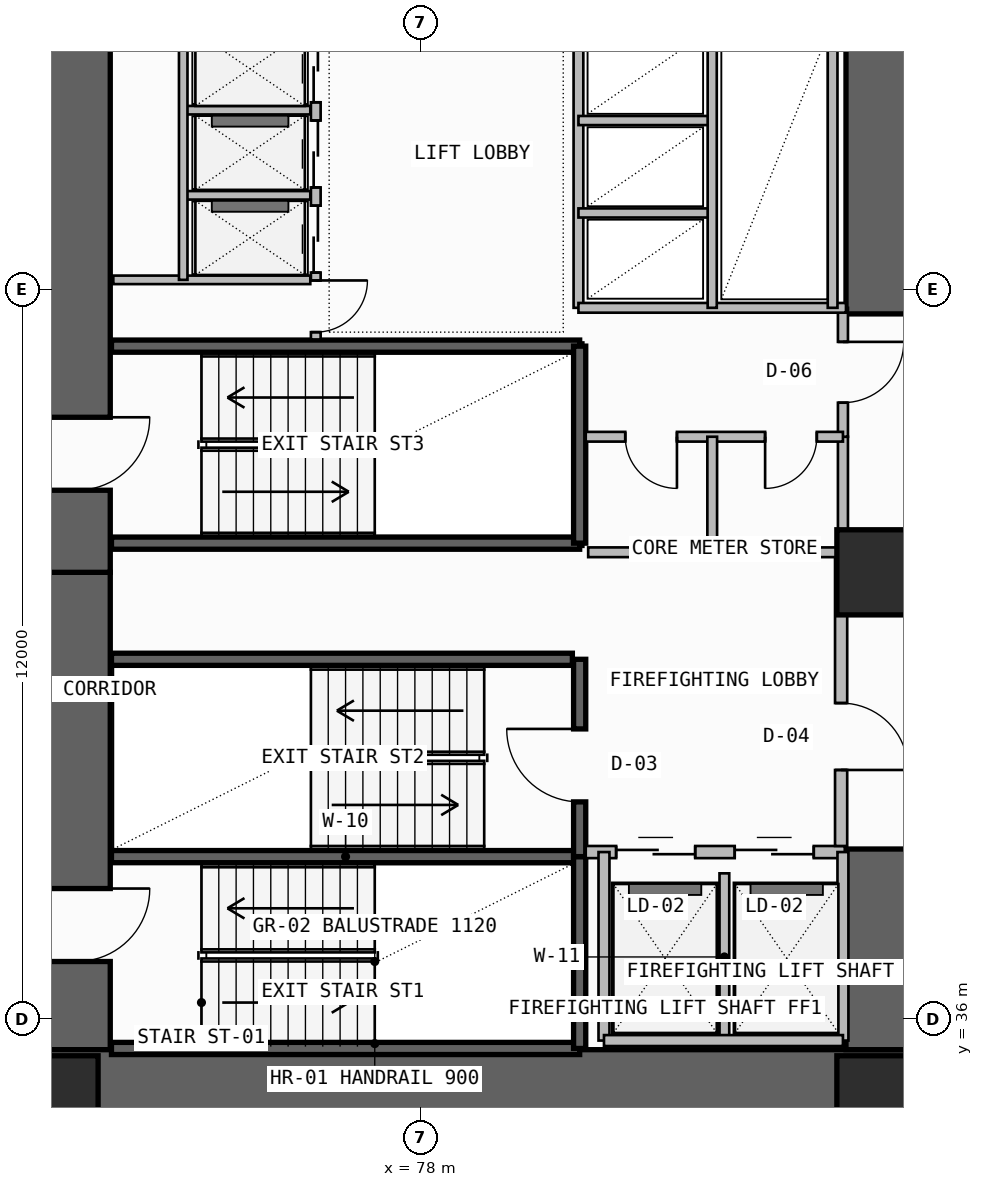
"""IFC4 building model, lengths in metres.
Left out: names, types, materials, properties, quantities, classifications, styles, units other than length and angle.
Written with IfcOpenShell. Run it as: python <this file> out.ifc"""

import sys

from ifc_helpers import new_model, si_unit, direction, frame, frame_2d, origin, origin_2d, place, context, subcontext, project, spatial, rectangle, extrude, element, fill, save


model = new_model("IFC4")
c1 = context("Model", 3, precision=1e-05, world=origin(), true_north=direction((0.0, 1.0)))
c2 = subcontext(c1, "Body", "Model", "MODEL_VIEW")
j1 = project(units=[si_unit("LENGTHUNIT", "METRE"), si_unit("PLANEANGLEUNIT", "RADIAN")], contexts=[c1])
p1 = place(None, origin())
s1 = spatial("IfcSite", under=j1, at=p1, CompositionType="ELEMENT")
p2 = place(p1, origin())
s2 = spatial("IfcBuilding", under=s1, at=p2, CompositionType="ELEMENT")
p3 = place(p2, frame((0.0, 0.0, 44.7)))
s3 = spatial("IfcBuildingStorey", under=s2, at=p3, CompositionType="ELEMENT", Elevation=44.7)
p4 = place(p3, frame((72.35, 35.5, -0.2), z_axis=(0.0, 0.0, 1.0), x_axis=(0.0, 1.0, 0.0)))
e1 = element("IfcWall", 1, at=p4, inside=s3, PredefinedType="SHEAR", context=c2, shape_type="SweptSolid", body=[
    extrude(rectangle(XDim=7.85, YDim=1.1, at=frame_2d((3.925, 0.0))), origin(), (0.0, 0.0, 1.0), 3.54),
])
p5 = place(p4, frame((1.45, 0.0, 0.2)))
e2 = element("IfcOpeningElement", 2, at=p5, cuts=e1, PredefinedType="OPENING", context=c2, shape_type="SweptSolid", body=[
    extrude(rectangle(XDim=1.2, YDim=2.2, at=frame_2d((0.6, 1.1))), frame((0.0, 0.56, 0.0), z_axis=(0.0, -1.0, 0.0), x_axis=(1.0, 0.0, 0.0)), (0.0, 0.0, 1.0), 1.12),
])
p6 = place(p3, frame((71.8, 34.95, -0.2), z_axis=(0.0, 0.0, 1.0), x_axis=(1.0, 0.0, 0.0)))
e3 = element("IfcWall", 3, at=p6, inside=s3, PredefinedType="SHEAR", context=c2, shape_type="SweptSolid", body=[
    extrude(rectangle(XDim=14.3, YDim=1.1, at=frame_2d((7.15, 0.0))), origin(), (0.0, 0.0, 1.0), 3.54),
])
p7 = place(p3, frame((85.55, 35.5, -0.2), z_axis=(0.0, 0.0, 1.0), x_axis=(0.0, 1.0, 0.0)))
e4 = element("IfcWall", 4, at=p7, inside=s3, PredefinedType="SHEAR", context=c2, shape_type="SweptSolid", body=[
    extrude(rectangle(XDim=3.3, YDim=1.1, at=frame_2d((1.65, 0.0))), origin(), (0.0, 0.0, 1.0), 3.54),
])
p8 = place(p3, frame((72.35, 43.35, -0.2), z_axis=(0.0, 0.0, 1.0), x_axis=(0.0, 1.0, 0.0)))
e5 = element("IfcWall", 5, at=p8, inside=s3, PredefinedType="SHEAR", context=c2, shape_type="SweptSolid", body=[
    extrude(rectangle(XDim=12.7, YDim=1.1, at=frame_2d((6.35, 0.0))), origin(), (0.0, 0.0, 1.0), 3.54),
])
p9 = place(p8, frame((1.35, 0.0, 0.2)))
e6 = element("IfcOpeningElement", 6, at=p9, cuts=e5, PredefinedType="OPENING", context=c2, shape_type="SweptSolid", body=[
    extrude(rectangle(XDim=1.2, YDim=2.2, at=frame_2d((0.6, 1.1))), frame((0.0, 0.56, 0.0), z_axis=(0.0, -1.0, 0.0), x_axis=(1.0, 0.0, 0.0)), (0.0, 0.0, 1.0), 1.12),
])
p10 = place(p3, frame((85.55, 47.6, -0.2), z_axis=(0.0, 0.0, 1.0), x_axis=(0.0, 1.0, 0.0)))
e7 = element("IfcWall", 7, at=p10, inside=s3, PredefinedType="SHEAR", context=c2, shape_type="SweptSolid", body=[
    extrude(rectangle(XDim=8.45, YDim=1.1, at=frame_2d((4.225, 0.0))), origin(), (0.0, 0.0, 1.0), 3.54),
])
for number, where, z_axis, x_axis in (
    (8, (72.0, 34.7, 0.0), (0.0, 0.0, 1.0), (1.0, 0.0, 0.0)),
    (9, (85.55, 34.7, 0.0), (0.0, 0.0, 1.0), (1.0, 0.0, 0.0)),
    (10, (85.55, 43.35, 0.0), (0.0, 0.0, 1.0), (1.0, 0.0, 0.0)),
):
    element("IfcColumn", number, at=place(p3, frame(where, z_axis=z_axis, x_axis=x_axis)), inside=s3, PredefinedType="COLUMN", context=c2, shape_type="SweptSolid", body=[
        extrude(rectangle(XDim=1.4, YDim=1.4, at=origin_2d()), origin(), (0.0, 0.0, 1.0), 3.6),
    ])
for number, where, z_axis, x_axis in (
    (11, (72.92, 35.52, -0.2), (0.0, 0.0, 1.0), (1.0, 0.0, 0.0)),
    (12, (72.92, 38.675, -0.2), (0.0, 0.0, 1.0), (1.0, 0.0, 0.0)),
):
    element("IfcWall", number, at=place(p3, frame(where, z_axis=z_axis, x_axis=x_axis)), inside=s3, PredefinedType="SOLIDWALL", context=c2, shape_type="SweptSolid", body=[
        extrude(rectangle(XDim=7.7, YDim=0.2, at=frame_2d((3.85, 0.0))), origin(), (0.0, 0.0, 1.0), 3.54),
    ])
p11 = place(p3, frame((80.62, 35.52, -0.2), z_axis=(0.0, 0.0, 1.0), x_axis=(0.0, 1.0, 0.0)))
e13 = element("IfcWall", 13, at=p11, inside=s3, PredefinedType="SOLIDWALL", context=c2, shape_type="SweptSolid", body=[
    extrude(rectangle(XDim=3.155, YDim=0.2, at=frame_2d((1.578, 0.0))), origin(), (0.0, 0.0, 1.0), 3.54),
])
p12 = place(p3, frame((80.62, 38.675, -0.2), z_axis=(0.0, 0.0, 1.0), x_axis=(0.0, 1.0, 0.0)))
e14 = element("IfcWall", 14, at=p12, inside=s3, PredefinedType="SOLIDWALL", context=c2, shape_type="SweptSolid", body=[
    extrude(rectangle(XDim=3.245, YDim=0.2, at=frame_2d((1.623, 0.0))), origin(), (0.0, 0.0, 1.0), 3.54),
])
p13 = place(p12, frame((0.9, 0.0, 0.2)))
e15 = element("IfcOpeningElement", 15, at=p13, cuts=e14, PredefinedType="OPENING", context=c2, shape_type="SweptSolid", body=[
    extrude(rectangle(XDim=1.2, YDim=2.2, at=frame_2d((0.6, 1.1))), frame((0.0, 0.11, 0.0), z_axis=(0.0, -1.0, 0.0), x_axis=(1.0, 0.0, 0.0)), (0.0, 0.0, 1.0), 0.22),
])
p14 = place(p3, frame((80.72, 38.75, 0.0), z_axis=(0.0, 0.0, 1.0), x_axis=(1.0, 0.0, 0.0)))
e16 = element("IfcWall", 16, at=p14, inside=s3, PredefinedType="SOLIDWALL", context=c2, shape_type="SweptSolid", body=[
    extrude(rectangle(XDim=4.26, YDim=0.2, at=frame_2d((2.13, 0.0))), origin(), (0.0, 0.0, 1.0), 3.34),
])
p15 = place(p14, frame((0.5, 0.0, 0.0)))
e17 = element("IfcOpeningElement", 17, at=p15, cuts=e16, PredefinedType="OPENING", context=c2, shape_type="SweptSolid", body=[
    extrude(rectangle(XDim=1.3, YDim=2.3, at=frame_2d((0.65, 1.15))), frame((0.0, 0.11, 0.0), z_axis=(0.0, -1.0, 0.0), x_axis=(1.0, 0.0, 0.0)), (0.0, 0.0, 1.0), 0.22),
])
p16 = place(p14, frame((2.45, 0.0, 0.0)))
e18 = element("IfcOpeningElement", 18, at=p16, cuts=e16, PredefinedType="OPENING", context=c2, shape_type="SweptSolid", body=[
    extrude(rectangle(XDim=1.3, YDim=2.3, at=frame_2d((0.65, 1.15))), frame((0.0, 0.11, 0.0), z_axis=(0.0, -1.0, 0.0), x_axis=(1.0, 0.0, 0.0)), (0.0, 0.0, 1.0), 0.22),
])
p17 = place(p3, frame((83.0, 35.65, 0.0), z_axis=(0.0, 0.0, 1.0), x_axis=(0.0, 1.0, 0.0)))
e19 = element("IfcWall", 19, at=p17, inside=s3, PredefinedType="PLUMBINGWALL", context=c2, shape_type="SweptSolid", body=[
    extrude(rectangle(XDim=2.75, YDim=0.16, at=frame_2d((1.375, 0.0))), origin(), (0.0, 0.0, 1.0), 3.34),
])
for number, where, z_axis, x_axis in (
    (20, (84.95, 35.65, 0.0), (0.0, 0.0, 1.0), (0.0, 1.0, 0.0)),
    (21, (81.02, 35.65, 0.0), (0.0, 0.0, 1.0), (0.0, 1.0, 0.0)),
):
    element("IfcWall", number, at=place(p3, frame(where, z_axis=z_axis, x_axis=x_axis)), inside=s3, PredefinedType="SOLIDWALL", context=c2, shape_type="SweptSolid", body=[
        extrude(rectangle(XDim=3.1, YDim=0.18, at=frame_2d((1.55, 0.0))), origin(), (0.0, 0.0, 1.0), 3.34),
    ])
p18 = place(p3, frame((81.02, 35.65, 0.0), z_axis=(0.0, 0.0, 1.0), x_axis=(1.0, 0.0, 0.0)))
e22 = element("IfcWall", 22, at=p18, inside=s3, PredefinedType="SOLIDWALL", context=c2, shape_type="SweptSolid", body=[
    extrude(rectangle(XDim=3.93, YDim=0.18, at=frame_2d((1.965, 0.0))), origin(), (0.0, 0.0, 1.0), 3.34),
])
p19 = place(p3, frame((84.92, 38.85, 0.0), z_axis=(0.0, 0.0, 1.0), x_axis=(0.0, 1.0, 0.0)))
e23 = element("IfcWall", 23, at=p19, inside=s3, PredefinedType="SOLIDWALL", context=c2, shape_type="SweptSolid", body=[
    extrude(rectangle(XDim=4.83, YDim=0.2, at=frame_2d((2.415, 0.0))), origin(), (0.0, 0.0, 1.0), 3.34),
])
p20 = place(p19, frame((1.25, 0.0, 0.0)))
e24 = element("IfcOpeningElement", 24, at=p20, cuts=e23, PredefinedType="OPENING", context=c2, shape_type="SweptSolid", body=[
    extrude(rectangle(XDim=1.1, YDim=2.2, at=frame_2d((0.55, 1.1))), frame((0.0, 0.11, 0.0), z_axis=(0.0, -1.0, 0.0), x_axis=(1.0, 0.0, 0.0)), (0.0, 0.0, 1.0), 0.22),
])
p21 = place(p3, frame((72.92, 41.92, -0.2), z_axis=(0.0, 0.0, 1.0), x_axis=(1.0, 0.0, 0.0)))
e25 = element("IfcWall", 25, at=p21, inside=s3, PredefinedType="SOLIDWALL", context=c2, shape_type="SweptSolid", body=[
    extrude(rectangle(XDim=7.58, YDim=0.2, at=frame_2d((3.79, 0.0))), origin(), (0.0, 0.0, 1.0), 3.54),
])
for number, where, z_axis, x_axis in (
    (26, (72.92, 43.83, -0.2), (0.0, 0.0, 1.0), (1.0, 0.0, 0.0)),
    (27, (72.92, 47.07, -0.2), (0.0, 0.0, 1.0), (1.0, 0.0, 0.0)),
):
    element("IfcWall", number, at=place(p3, frame(where, z_axis=z_axis, x_axis=x_axis)), inside=s3, PredefinedType="SOLIDWALL", context=c2, shape_type="SweptSolid", body=[
        extrude(rectangle(XDim=7.7, YDim=0.2, at=frame_2d((3.85, 0.0))), origin(), (0.0, 0.0, 1.0), 3.54),
    ])
p22 = place(p3, frame((80.62, 43.83, -0.2), z_axis=(0.0, 0.0, 1.0), x_axis=(0.0, 1.0, 0.0)))
e28 = element("IfcWall", 28, at=p22, inside=s3, PredefinedType="SOLIDWALL", context=c2, shape_type="SweptSolid", body=[
    extrude(rectangle(XDim=3.24, YDim=0.2, at=frame_2d((1.62, 0.0))), origin(), (0.0, 0.0, 1.0), 3.54),
])
p23 = place(p3, frame((84.95, 43.68, 0.0), z_axis=(0.0, 0.0, 1.0), x_axis=(0.0, 1.0, 0.0)))
e29 = element("IfcWall", 29, at=p23, inside=s3, PredefinedType="PLUMBINGWALL", context=c2, shape_type="SweptSolid", body=[
    extrude(rectangle(XDim=1.9, YDim=0.165, at=frame_2d((0.95, 0.0))), origin(), (0.0, 0.0, 1.0), 3.34),
])
p24 = place(p3, frame((84.95, 45.58, 0.0), z_axis=(0.0, 0.0, 1.0), x_axis=(0.0, 1.0, 0.0)))
e30 = element("IfcWall", 30, at=p24, inside=s3, PredefinedType="PARTITIONING", context=c2, shape_type="SweptSolid", body=[
    extrude(rectangle(XDim=2.12, YDim=0.165, at=frame_2d((1.06, 0.0))), origin(), (0.0, 0.0, 1.0), 3.34),
])
p25 = place(p24, frame((0.56, 0.0, 0.0)))
e31 = element("IfcOpeningElement", 31, at=p25, cuts=e30, PredefinedType="OPENING", context=c2, shape_type="SweptSolid", body=[
    extrude(rectangle(XDim=1.0, YDim=2.2, at=frame_2d((0.5, 1.1))), frame((0.0, 0.093, 0.0), z_axis=(0.0, -1.0, 0.0), x_axis=(1.0, 0.0, 0.0)), (0.0, 0.0, 1.0), 0.185),
])
p26 = place(p3, frame((80.72, 45.58, 0.0), z_axis=(0.0, 0.0, 1.0), x_axis=(1.0, 0.0, 0.0)))
e32 = element("IfcWall", 32, at=p26, inside=s3, PredefinedType="PLUMBINGWALL", context=c2, shape_type="SweptSolid", body=[
    extrude(rectangle(XDim=4.23, YDim=0.16, at=frame_2d((2.115, 0.0))), origin(), (0.0, 0.0, 1.0), 3.34),
])
p27 = place(p26, frame((0.65, 0.0, 0.0)))
e33 = element("IfcOpeningElement", 33, at=p27, cuts=e32, PredefinedType="OPENING", context=c2, shape_type="SweptSolid", body=[
    extrude(rectangle(XDim=0.85, YDim=2.05, at=frame_2d((0.425, 1.025))), frame((0.0, 0.09, 0.0), z_axis=(0.0, -1.0, 0.0), x_axis=(1.0, 0.0, 0.0)), (0.0, 0.0, 1.0), 0.18),
])
p28 = place(p26, frame((2.95, 0.0, 0.0)))
e34 = element("IfcOpeningElement", 34, at=p28, cuts=e32, PredefinedType="OPENING", context=c2, shape_type="SweptSolid", body=[
    extrude(rectangle(XDim=0.85, YDim=2.05, at=frame_2d((0.425, 1.025))), frame((0.0, 0.09, 0.0), z_axis=(0.0, -1.0, 0.0), x_axis=(1.0, 0.0, 0.0)), (0.0, 0.0, 1.0), 0.18),
])
p29 = place(p3, frame((80.76, 43.68, 0.0), z_axis=(0.0, 0.0, 1.0), x_axis=(1.0, 0.0, 0.0)))
e35 = element("IfcWall", 35, at=p29, inside=s3, PredefinedType="PLUMBINGWALL", context=c2, shape_type="SweptSolid", body=[
    extrude(rectangle(XDim=4.19, YDim=0.16, at=frame_2d((2.095, 0.0))), origin(), (0.0, 0.0, 1.0), 3.34),
])
p30 = place(p3, frame((82.8, 43.68, 0.0), z_axis=(0.0, 0.0, 1.0), x_axis=(0.0, 1.0, 0.0)))
e36 = element("IfcWall", 36, at=p30, inside=s3, PredefinedType="PLUMBINGWALL", context=c2, shape_type="SweptSolid", body=[
    extrude(rectangle(XDim=1.9, YDim=0.16, at=frame_2d((0.95, 0.0))), origin(), (0.0, 0.0, 1.0), 3.34),
])
p31 = place(p3, frame((76.28, 47.18, 0.0), z_axis=(0.0, 0.0, 1.0), x_axis=(0.0, 1.0, 0.0)))
e37 = element("IfcWall", 37, at=p31, inside=s3, PredefinedType="SOLIDWALL", context=c2, shape_type="SweptSolid", body=[
    extrude(rectangle(XDim=5.14, YDim=0.16, at=frame_2d((2.57, 0.0))), origin(), (0.0, 0.0, 1.0), 3.34),
])
p32 = place(p31, frame((1.1, 0.0, 0.0)))
e38 = element("IfcOpeningElement", 38, at=p32, cuts=e37, PredefinedType="OPENING", context=c2, shape_type="SweptSolid", body=[
    extrude(rectangle(XDim=1.1, YDim=2.25, at=frame_2d((0.55, 1.125))), frame((0.0, 0.09, 0.0), z_axis=(0.0, -1.0, 0.0), x_axis=(1.0, 0.0, 0.0)), (0.0, 0.0, 1.0), 0.18),
])
p33 = place(p31, frame((2.5, 0.0, 0.0)))
e39 = element("IfcOpeningElement", 39, at=p33, cuts=e37, PredefinedType="OPENING", context=c2, shape_type="SweptSolid", body=[
    extrude(rectangle(XDim=1.1, YDim=2.25, at=frame_2d((0.55, 1.125))), frame((0.0, 0.09, 0.0), z_axis=(0.0, -1.0, 0.0), x_axis=(1.0, 0.0, 0.0)), (0.0, 0.0, 1.0), 0.18),
])
p34 = place(p31, frame((3.9, 0.0, 0.0)))
e40 = element("IfcOpeningElement", 40, at=p34, cuts=e37, PredefinedType="OPENING", context=c2, shape_type="SweptSolid", body=[
    extrude(rectangle(XDim=1.1, YDim=2.25, at=frame_2d((0.55, 1.125))), frame((0.0, 0.09, 0.0), z_axis=(0.0, -1.0, 0.0), x_axis=(1.0, 0.0, 0.0)), (0.0, 0.0, 1.0), 0.18),
])
p35 = place(p31, frame((0.12, 0.0, 0.0)))
e41 = element("IfcOpeningElement", 41, at=p35, cuts=e37, PredefinedType="OPENING", context=c2, shape_type="SweptSolid", body=[
    extrude(rectangle(XDim=0.85, YDim=2.05, at=frame_2d((0.425, 1.025))), frame((0.0, 0.09, 0.0), z_axis=(0.0, -1.0, 0.0), x_axis=(1.0, 0.0, 0.0)), (0.0, 0.0, 1.0), 0.18),
])
p36 = place(p3, frame((72.95, 48.16, 0.0), z_axis=(0.0, 0.0, 1.0), x_axis=(1.0, 0.0, 0.0)))
e42 = element("IfcWall", 42, at=p36, inside=s3, PredefinedType="PLUMBINGWALL", context=c2, shape_type="SweptSolid", body=[
    extrude(rectangle(XDim=3.24, YDim=0.14, at=frame_2d((1.62, 0.0))), origin(), (0.0, 0.0, 1.0), 3.34),
])
for number, where, z_axis, x_axis in (
    (43, (74.15, 49.55, 0.0), (0.0, 0.0, 1.0), (1.0, 0.0, 0.0)),
    (44, (74.15, 50.95, 0.0), (0.0, 0.0, 1.0), (1.0, 0.0, 0.0)),
):
    element("IfcWall", number, at=place(p3, frame(where, z_axis=z_axis, x_axis=x_axis)), inside=s3, PredefinedType="PLUMBINGWALL", context=c2, shape_type="SweptSolid", body=[
        extrude(rectangle(XDim=2.04, YDim=0.14, at=frame_2d((1.02, 0.0))), origin(), (0.0, 0.0, 1.0), 3.34),
    ])
p37 = place(p3, frame((74.1, 48.16, 0.0), z_axis=(0.0, 0.0, 1.0), x_axis=(0.0, 1.0, 0.0)))
e45 = element("IfcWall", 45, at=p37, inside=s3, PredefinedType="PLUMBINGWALL", context=c2, shape_type="SweptSolid", body=[
    extrude(rectangle(XDim=4.16, YDim=0.14, at=frame_2d((2.08, 0.0))), origin(), (0.0, 0.0, 1.0), 3.34),
])
p38 = place(p3, frame((80.6, 47.7, 0.0), z_axis=(0.0, 0.0, 1.0), x_axis=(0.0, 1.0, 0.0)))
e46 = element("IfcWall", 46, at=p38, inside=s3, PredefinedType="SOLIDWALL", context=c2, shape_type="SweptSolid", body=[
    extrude(rectangle(XDim=4.6, YDim=0.16, at=frame_2d((2.3, 0.0))), origin(), (0.0, 0.0, 1.0), 3.34),
])
p39 = place(p3, frame((80.6, 47.7, 0.0), z_axis=(0.0, 0.0, 1.0), x_axis=(1.0, 0.0, 0.0)))
e47 = element("IfcWall", 47, at=p39, inside=s3, PredefinedType="SOLIDWALL", context=c2, shape_type="SweptSolid", body=[
    extrude(rectangle(XDim=4.4, YDim=0.16, at=frame_2d((2.2, 0.0))), origin(), (0.0, 0.0, 1.0), 3.34),
])
for number, where, z_axis, x_axis in (
    (48, (80.6, 49.26, 0.0), (0.0, 0.0, 1.0), (1.0, 0.0, 0.0)),
    (49, (80.6, 50.78, 0.0), (0.0, 0.0, 1.0), (1.0, 0.0, 0.0)),
):
    element("IfcWall", number, at=place(p3, frame(where, z_axis=z_axis, x_axis=x_axis)), inside=s3, PredefinedType="PLUMBINGWALL", context=c2, shape_type="SweptSolid", body=[
        extrude(rectangle(XDim=2.2, YDim=0.15, at=frame_2d((1.1, 0.0))), origin(), (0.0, 0.0, 1.0), 3.34),
    ])
p40 = place(p3, frame((82.8, 47.7, 0.0), z_axis=(0.0, 0.0, 1.0), x_axis=(0.0, 1.0, 0.0)))
e50 = element("IfcWall", 50, at=p40, inside=s3, PredefinedType="PLUMBINGWALL", context=c2, shape_type="SweptSolid", body=[
    extrude(rectangle(XDim=4.6, YDim=0.15, at=frame_2d((2.3, 0.0))), origin(), (0.0, 0.0, 1.0), 3.34),
])
p41 = place(p3, frame((84.78, 47.7, 0.0), z_axis=(0.0, 0.0, 1.0), x_axis=(0.0, 1.0, 0.0)))
e51 = element("IfcWall", 51, at=p41, inside=s3, PredefinedType="SOLIDWALL", context=c2, shape_type="SweptSolid", body=[
    extrude(rectangle(XDim=4.6, YDim=0.16, at=frame_2d((2.3, 0.0))), origin(), (0.0, 0.0, 1.0), 3.34),
])
p42 = place(p5, frame((1.2, 0.0, 0.0), z_axis=(0.0, 0.0, 1.0), x_axis=(-1.0, 0.0, 0.0)))
e52 = element("IfcDoor", 52, at=p42, inside=s3, OperationType="SINGLE_SWING_LEFT", PredefinedType="USERDEFINED", context=c2, shape_type="SweptSolid", body=[
    extrude(rectangle(XDim=1.2, YDim=2.2, at=frame_2d((0.6, 1.1))), frame((0.0, 0.025, 0.0), z_axis=(0.0, -1.0, 0.0), x_axis=(1.0, 0.0, 0.0)), (0.0, 0.0, 1.0), 0.05),
])
fill(e2, e52)
p43 = place(p13, origin())
e53 = element("IfcDoor", 53, at=p43, inside=s3, OperationType="SINGLE_SWING_RIGHT", PredefinedType="USERDEFINED", context=c2, shape_type="SweptSolid", body=[
    extrude(rectangle(XDim=1.2, YDim=2.2, at=frame_2d((0.6, 1.1))), frame((0.0, 0.025, 0.0), z_axis=(0.0, -1.0, 0.0), x_axis=(1.0, 0.0, 0.0)), (0.0, 0.0, 1.0), 0.05),
])
fill(e15, e53)
p44 = place(p15, origin())
e54 = element("IfcDoor", 54, at=p44, inside=s3, OperationType="DOUBLE_DOOR_SLIDING", PredefinedType="DOOR", context=c2, shape_type="SweptSolid", body=[
    extrude(rectangle(XDim=1.3, YDim=2.3, at=frame_2d((0.65, 1.15))), frame((0.0, 0.025, 0.0), z_axis=(0.0, -1.0, 0.0), x_axis=(1.0, 0.0, 0.0)), (0.0, 0.0, 1.0), 0.05),
])
fill(e17, e54)
p45 = place(p16, origin())
e55 = element("IfcDoor", 55, at=p45, inside=s3, OperationType="DOUBLE_DOOR_SLIDING", PredefinedType="DOOR", context=c2, shape_type="SweptSolid", body=[
    extrude(rectangle(XDim=1.3, YDim=2.3, at=frame_2d((0.65, 1.15))), frame((0.0, 0.025, 0.0), z_axis=(0.0, -1.0, 0.0), x_axis=(1.0, 0.0, 0.0)), (0.0, 0.0, 1.0), 0.05),
])
fill(e18, e55)
p46 = place(p20, frame((1.1, 0.0, 0.0), z_axis=(0.0, 0.0, 1.0), x_axis=(-1.0, 0.0, 0.0)))
e56 = element("IfcDoor", 56, at=p46, inside=s3, OperationType="SINGLE_SWING_RIGHT", PredefinedType="DOOR", context=c2, shape_type="SweptSolid", body=[
    extrude(rectangle(XDim=1.1, YDim=2.2, at=frame_2d((0.55, 1.1))), frame((0.0, 0.025, 0.0), z_axis=(0.0, -1.0, 0.0), x_axis=(1.0, 0.0, 0.0)), (0.0, 0.0, 1.0), 0.05),
])
fill(e24, e56)
p47 = place(p9, frame((1.2, 0.0, 0.0), z_axis=(0.0, 0.0, 1.0), x_axis=(-1.0, 0.0, 0.0)))
e57 = element("IfcDoor", 57, at=p47, inside=s3, OperationType="SINGLE_SWING_LEFT", PredefinedType="USERDEFINED", context=c2, shape_type="SweptSolid", body=[
    extrude(rectangle(XDim=1.2, YDim=2.2, at=frame_2d((0.6, 1.1))), frame((0.0, 0.025, 0.0), z_axis=(0.0, -1.0, 0.0), x_axis=(1.0, 0.0, 0.0)), (0.0, 0.0, 1.0), 0.05),
])
fill(e6, e57)
p48 = place(p25, frame((1.0, 0.0, 0.0), z_axis=(0.0, 0.0, 1.0), x_axis=(-1.0, 0.0, 0.0)))
e58 = element("IfcDoor", 58, at=p48, inside=s3, OperationType="SINGLE_SWING_LEFT", PredefinedType="DOOR", context=c2, shape_type="SweptSolid", body=[
    extrude(rectangle(XDim=1.0, YDim=2.2, at=frame_2d((0.5, 1.1))), frame((0.0, 0.025, 0.0), z_axis=(0.0, -1.0, 0.0), x_axis=(1.0, 0.0, 0.0)), (0.0, 0.0, 1.0), 0.05),
])
fill(e31, e58)
p49 = place(p27, frame((0.85, 0.0, 0.0), z_axis=(0.0, 0.0, 1.0), x_axis=(-1.0, 0.0, 0.0)))
e59 = element("IfcDoor", 59, at=p49, inside=s3, OperationType="SINGLE_SWING_LEFT", PredefinedType="DOOR", context=c2, shape_type="SweptSolid", body=[
    extrude(rectangle(XDim=0.85, YDim=2.05, at=frame_2d((0.425, 1.025))), frame((0.0, 0.025, 0.0), z_axis=(0.0, -1.0, 0.0), x_axis=(1.0, 0.0, 0.0)), (0.0, 0.0, 1.0), 0.05),
])
fill(e33, e59)
p50 = place(p28, frame((0.85, 0.0, 0.0), z_axis=(0.0, 0.0, 1.0), x_axis=(-1.0, 0.0, 0.0)))
e60 = element("IfcDoor", 60, at=p50, inside=s3, OperationType="SINGLE_SWING_RIGHT", PredefinedType="DOOR", context=c2, shape_type="SweptSolid", body=[
    extrude(rectangle(XDim=0.85, YDim=2.05, at=frame_2d((0.425, 1.025))), frame((0.0, 0.025, 0.0), z_axis=(0.0, -1.0, 0.0), x_axis=(1.0, 0.0, 0.0)), (0.0, 0.0, 1.0), 0.05),
])
fill(e34, e60)
p51 = place(p32, origin())
e61 = element("IfcDoor", 61, at=p51, inside=s3, OperationType="DOUBLE_DOOR_SLIDING", PredefinedType="DOOR", context=c2, shape_type="SweptSolid", body=[
    extrude(rectangle(XDim=1.1, YDim=2.25, at=frame_2d((0.55, 1.125))), frame((0.0, 0.025, 0.0), z_axis=(0.0, -1.0, 0.0), x_axis=(1.0, 0.0, 0.0)), (0.0, 0.0, 1.0), 0.05),
])
fill(e38, e61)
p52 = place(p33, origin())
e62 = element("IfcDoor", 62, at=p52, inside=s3, OperationType="DOUBLE_DOOR_SLIDING", PredefinedType="DOOR", context=c2, shape_type="SweptSolid", body=[
    extrude(rectangle(XDim=1.1, YDim=2.25, at=frame_2d((0.55, 1.125))), frame((0.0, 0.025, 0.0), z_axis=(0.0, -1.0, 0.0), x_axis=(1.0, 0.0, 0.0)), (0.0, 0.0, 1.0), 0.05),
])
fill(e39, e62)
p53 = place(p34, origin())
e63 = element("IfcDoor", 63, at=p53, inside=s3, OperationType="DOUBLE_DOOR_SLIDING", PredefinedType="DOOR", context=c2, shape_type="SweptSolid", body=[
    extrude(rectangle(XDim=1.1, YDim=2.25, at=frame_2d((0.55, 1.125))), frame((0.0, 0.025, 0.0), z_axis=(0.0, -1.0, 0.0), x_axis=(1.0, 0.0, 0.0)), (0.0, 0.0, 1.0), 0.05),
])
fill(e40, e63)
p54 = place(p35, frame((0.85, 0.0, 0.0), z_axis=(0.0, 0.0, 1.0), x_axis=(-1.0, 0.0, 0.0)))
e64 = element("IfcDoor", 64, at=p54, inside=s3, OperationType="SINGLE_SWING_LEFT", PredefinedType="DOOR", context=c2, shape_type="SweptSolid", body=[
    extrude(rectangle(XDim=0.85, YDim=2.05, at=frame_2d((0.425, 1.025))), frame((0.0, 0.025, 0.0), z_axis=(0.0, -1.0, 0.0), x_axis=(1.0, 0.0, 0.0)), (0.0, 0.0, 1.0), 0.05),
])
fill(e41, e64)
save(model, sys.argv[1])
